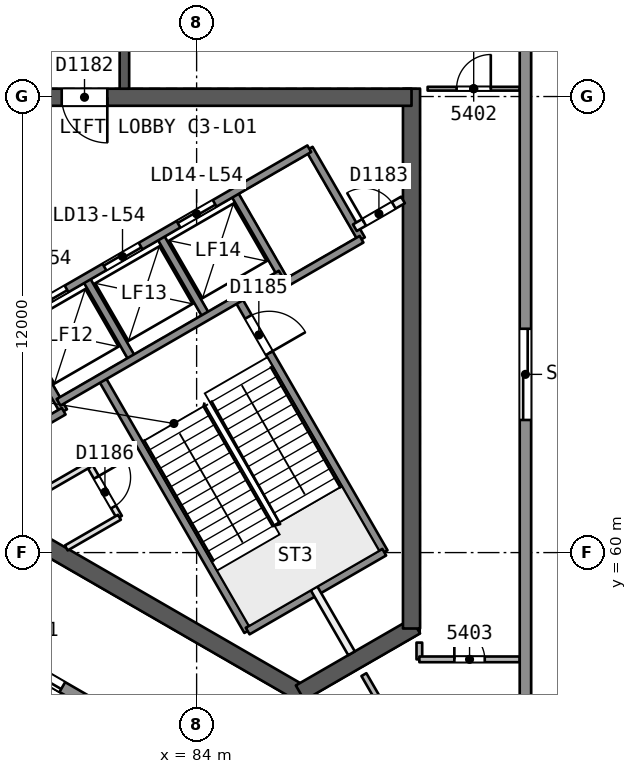
"""IFC4 building model, lengths in metres.
Left out: names, types, materials, properties, quantities, classifications, styles, units other than length and angle.
Written with IfcOpenShell. Run it as: python <this file> out.ifc"""

import sys

from ifc_helpers import new_model, si_unit, direction, frame, frame_2d, origin, place, context, subcontext, project, spatial, rectangle, extrude, element, fill, save


model = new_model("IFC4")
c1 = context("Model", 3, precision=1e-05, world=origin(), true_north=direction((0.0, 1.0)))
c2 = subcontext(c1, "Body", "Model", "MODEL_VIEW")
j1 = project(units=[si_unit("LENGTHUNIT", "METRE"), si_unit("PLANEANGLEUNIT", "RADIAN")], contexts=[c1])
p1 = place(None, origin())
s1 = spatial("IfcSite", under=j1, at=p1, CompositionType="ELEMENT")
p2 = place(p1, origin())
s2 = spatial("IfcBuilding", under=s1, at=p2, CompositionType="ELEMENT")
p3 = place(p2, frame((0.0, 0.0, 220.6)))
s3 = spatial("IfcBuildingStorey", under=s2, at=p3, CompositionType="ELEMENT", Elevation=220.6)
p4 = place(p3, frame((74.617, 63.299, 0.0), z_axis=(0.0, 0.0, 1.0), x_axis=(0.86602594008, -0.499999071108, 0.0)))
e1 = element("IfcWall", 1, at=p4, inside=s3, PredefinedType="SHEAR", context=c2, shape_type="SweptSolid", body=[
    extrude(rectangle(XDim=14.108, YDim=0.45, at=frame_2d((7.054, 0.0))), origin(), (0.0, 0.0, 1.0), 3.7),
])
p5 = place(p3, frame((86.723, 56.31, 0.0), z_axis=(0.0, 0.0, 1.0), x_axis=(0.866042179588, 0.49997094233, 0.0)))
e2 = element("IfcWall", 2, at=p5, inside=s3, PredefinedType="SHEAR", context=c2, shape_type="SweptSolid", body=[
    extrude(rectangle(XDim=3.515, YDim=0.45, at=frame_2d((1.758, 0.0))), origin(), (0.0, 0.0, 1.0), 3.7),
])
p6 = place(p3, frame((89.655, 58.002, 0.0), z_axis=(0.0, 0.0, 1.0), x_axis=(0.0, 1.0, 0.0)))
e3 = element("IfcWall", 3, at=p6, inside=s3, PredefinedType="SHEAR", context=c2, shape_type="SweptSolid", body=[
    extrude(rectangle(XDim=14.204, YDim=0.45, at=frame_2d((7.102, 0.0))), origin(), (0.0, 0.0, 1.0), 3.7),
])
p7 = place(p3, frame((89.655, 71.981, 0.0), z_axis=(0.0, 0.0, 1.0), x_axis=(-1.0, 0.0, 0.0)))
e4 = element("IfcWall", 4, at=p7, inside=s3, PredefinedType="SHEAR", context=c2, shape_type="SweptSolid", body=[
    extrude(rectangle(XDim=10.155, YDim=0.45, at=frame_2d((5.078, 0.0))), origin(), (0.0, 0.0, 1.0), 3.7),
])
p8 = place(p7, frame((8.005, 0.0, 0.0)))
e5 = element("IfcOpeningElement", 5, at=p8, cuts=e4, PredefinedType="OPENING", context=c2, shape_type="SweptSolid", body=[
    extrude(rectangle(XDim=1.2, YDim=2.1, at=frame_2d((0.6, 1.05))), frame((0.0, 0.235, 0.0), z_axis=(0.0, -1.0, 0.0), x_axis=(1.0, 0.0, 0.0)), (0.0, 0.0, 1.0), 0.471),
])
p9 = place(p3, frame((82.1, 72.206, 0.0), z_axis=(0.0, 0.0, 1.0), x_axis=(0.0, 1.0, 0.0)))
e6 = element("IfcWall", 6, at=p9, inside=s3, PredefinedType="SHEAR", context=c2, shape_type="SweptSolid", body=[
    extrude(rectangle(XDim=15.588, YDim=0.25, at=frame_2d((7.794, 0.0))), origin(), (0.0, 0.0, 1.0), 3.3),
])
p10 = place(p9, frame((2.15, 0.0, 0.0)))
e7 = element("IfcOpeningElement", 7, at=p10, cuts=e6, PredefinedType="OPENING", context=c2, shape_type="SweptSolid", body=[
    extrude(rectangle(XDim=1.0, YDim=2.1, at=frame_2d((0.5, 1.05))), frame((0.0, 0.135, 0.0), z_axis=(0.0, -1.0, 0.0), x_axis=(1.0, 0.0, 0.0)), (0.0, 0.0, 1.0), 0.271),
])
p11 = place(p9, frame((8.75, 0.0, 0.0)))
e8 = element("IfcOpeningElement", 8, at=p11, cuts=e6, PredefinedType="OPENING", context=c2, shape_type="SweptSolid", body=[
    extrude(rectangle(XDim=1.0, YDim=2.1, at=frame_2d((0.5, 1.05))), frame((0.0, 0.135, 0.0), z_axis=(0.0, -1.0, 0.0), x_axis=(1.0, 0.0, 0.0)), (0.0, 0.0, 1.0), 0.271),
])
p12 = place(p9, frame((12.594, 0.0, 0.0)))
e9 = element("IfcOpeningElement", 9, at=p12, cuts=e6, PredefinedType="OPENING", context=c2, shape_type="SweptSolid", body=[
    extrude(rectangle(XDim=1.0, YDim=2.1, at=frame_2d((0.5, 1.05))), frame((0.0, 0.135, 0.0), z_axis=(0.0, -1.0, 0.0), x_axis=(1.0, 0.0, 0.0)), (0.0, 0.0, 1.0), 0.271),
])
p13 = place(p3, frame((90.079, 72.206, 0.0), z_axis=(0.0, 0.0, 1.0), x_axis=(1.0, 0.0, 0.0)))
e10 = element("IfcWall", 10, at=p13, inside=s3, PredefinedType="PARTITIONING", context=c2, shape_type="SweptSolid", body=[
    extrude(rectangle(XDim=2.424, YDim=0.1, at=frame_2d((1.212, 0.0))), origin(), (0.0, 0.0, 1.0), 3.3),
])
p14 = place(p13, frame((0.762, 0.0, 0.0)))
e11 = element("IfcOpeningElement", 11, at=p14, cuts=e10, PredefinedType="OPENING", context=c2, shape_type="SweptSolid", body=[
    extrude(rectangle(XDim=0.9, YDim=2.1, at=frame_2d((0.45, 1.05))), frame((0.0, 0.061, 0.0), z_axis=(0.0, -1.0, 0.0), x_axis=(1.0, 0.0, 0.0)), (0.0, 0.0, 1.0), 0.121),
])
p15 = place(p3, frame((89.861, 57.632, 0.0), z_axis=(0.0, 0.0, 1.0), x_axis=(0.0, -1.0, 0.0)))
e12 = element("IfcWall", 12, at=p15, inside=s3, PredefinedType="PARTITIONING", context=c2, shape_type="SweptSolid", body=[
    extrude(rectangle(XDim=0.441, YDim=0.15, at=frame_2d((0.22, 0.0))), origin(), (0.0, 0.0, 1.0), 3.3),
])
p16 = place(p3, frame((89.861, 57.191, 0.0), z_axis=(0.0, 0.0, 1.0), x_axis=(1.0, 0.0, 0.0)))
e13 = element("IfcWall", 13, at=p16, inside=s3, PredefinedType="PARTITIONING", context=c2, shape_type="SweptSolid", body=[
    extrude(rectangle(XDim=2.642, YDim=0.15, at=frame_2d((1.321, 0.0))), origin(), (0.0, 0.0, 1.0), 3.3),
])
p17 = place(p16, frame((0.921, 0.0, 0.0)))
e14 = element("IfcOpeningElement", 14, at=p17, cuts=e13, PredefinedType="OPENING", context=c2, shape_type="SweptSolid", body=[
    extrude(rectangle(XDim=0.8, YDim=2.1, at=frame_2d((0.4, 1.05))), frame((0.0, 0.085, 0.0), z_axis=(0.0, -1.0, 0.0), x_axis=(1.0, 0.0, 0.0)), (0.0, 0.0, 1.0), 0.171),
])
p18 = place(p3, frame((88.402, 56.789, 0.0), z_axis=(0.0, 0.0, 1.0), x_axis=(0.499980071345, -0.866036909293, 0.0)))
e15 = element("IfcWall", 15, at=p18, inside=s3, PredefinedType="PARTITIONING", context=c2, shape_type="SweptSolid", body=[
    extrude(rectangle(XDim=3.856, YDim=0.15, at=frame_2d((1.928, 0.0))), origin(), (0.0, 0.0, 1.0), 3.3),
])
p19 = place(p3, frame((92.652, 105.381, 0.0), z_axis=(0.0, 0.0, 1.0), x_axis=(0.0, -1.0, 0.0)))
e16 = element("IfcWall", 16, at=p19, inside=s3, PredefinedType="SOLIDWALL", context=c2, shape_type="SweptSolid", body=[
    extrude(rectangle(XDim=50.762, YDim=0.3, at=frame_2d((25.381, 0.0))), origin(), (0.0, 0.0, 1.0), 3.3),
])
p20 = place(p19, frame((29.325, 0.0, 0.0)))
e17 = element("IfcOpeningElement", 17, at=p20, cuts=e16, PredefinedType="OPENING", context=c2, shape_type="SweptSolid", body=[
    extrude(rectangle(XDim=2.4, YDim=2.4, at=frame_2d((1.2, 1.2))), frame((0.0, 0.161, 0.0), z_axis=(0.0, -1.0, 0.0), x_axis=(1.0, 0.0, 0.0)), (0.0, 0.0, 1.0), 0.321),
])
p21 = place(p19, frame((39.492, 0.0, 0.0)))
e18 = element("IfcOpeningElement", 18, at=p21, cuts=e16, PredefinedType="OPENING", context=c2, shape_type="SweptSolid", body=[
    extrude(rectangle(XDim=2.4, YDim=2.4, at=frame_2d((1.2, 1.2))), frame((0.0, 0.161, 0.0), z_axis=(0.0, -1.0, 0.0), x_axis=(1.0, 0.0, 0.0)), (0.0, 0.0, 1.0), 0.321),
])
p22 = place(p19, frame((18.881, 0.0, 0.0)))
e19 = element("IfcOpeningElement", 19, at=p22, cuts=e16, PredefinedType="OPENING", context=c2, shape_type="SweptSolid", body=[
    extrude(rectangle(XDim=2.4, YDim=2.4, at=frame_2d((1.2, 1.2))), frame((0.0, 0.161, 0.0), z_axis=(0.0, -1.0, 0.0), x_axis=(1.0, 0.0, 0.0)), (0.0, 0.0, 1.0), 0.321),
])
p23 = place(p19, frame((8.878, 0.0, 0.0)))
e20 = element("IfcOpeningElement", 20, at=p23, cuts=e16, PredefinedType="OPENING", context=c2, shape_type="SweptSolid", body=[
    extrude(rectangle(XDim=2.4, YDim=2.4, at=frame_2d((1.2, 1.2))), frame((0.0, 0.161, 0.0), z_axis=(0.0, -1.0, 0.0), x_axis=(1.0, 0.0, 0.0)), (0.0, 0.0, 1.0), 0.321),
])
p24 = place(p19, frame((24.025, 0.0, 0.0)))
e21 = element("IfcOpeningElement", 21, at=p24, cuts=e16, PredefinedType="OPENING", context=c2, shape_type="SweptSolid", body=[
    extrude(rectangle(XDim=2.4, YDim=2.4, at=frame_2d((1.2, 1.2))), frame((0.0, 0.161, 0.0), z_axis=(0.0, -1.0, 0.0), x_axis=(1.0, 0.0, 0.0)), (0.0, 0.0, 1.0), 0.321),
])
p25 = place(p3, frame((88.155, 52.022, 0.0), z_axis=(0.0, 0.0, 1.0), x_axis=(-0.866024521231, 0.500001528624, 0.0)))
e22 = element("IfcWall", 22, at=p25, inside=s3, PredefinedType="SOLIDWALL", context=c2, shape_type="SweptSolid", body=[
    extrude(rectangle(XDim=50.762, YDim=0.3, at=frame_2d((25.381, 0.0))), origin(), (0.0, 0.0, 1.0), 3.3),
])
p26 = place(p25, frame((23.402, 0.0, 0.0)))
e23 = element("IfcOpeningElement", 23, at=p26, cuts=e22, PredefinedType="OPENING", context=c2, shape_type="SweptSolid", body=[
    extrude(rectangle(XDim=2.4, YDim=2.4, at=frame_2d((1.2, 1.2))), frame((0.0, 0.161, 0.0), z_axis=(0.0, -1.0, 0.0), x_axis=(1.0, 0.0, 0.0)), (0.0, 0.0, 1.0), 0.321),
])
p27 = place(p25, frame((29.013, 0.0, 0.0)))
e24 = element("IfcOpeningElement", 24, at=p27, cuts=e22, PredefinedType="OPENING", context=c2, shape_type="SweptSolid", body=[
    extrude(rectangle(XDim=2.4, YDim=2.4, at=frame_2d((1.2, 1.2))), frame((0.0, 0.161, 0.0), z_axis=(0.0, -1.0, 0.0), x_axis=(1.0, 0.0, 0.0)), (0.0, 0.0, 1.0), 0.321),
])
p28 = place(p25, frame((39.492, 0.0, 0.0)))
e25 = element("IfcOpeningElement", 25, at=p28, cuts=e22, PredefinedType="OPENING", context=c2, shape_type="SweptSolid", body=[
    extrude(rectangle(XDim=2.4, YDim=2.4, at=frame_2d((1.2, 1.2))), frame((0.0, 0.161, 0.0), z_axis=(0.0, -1.0, 0.0), x_axis=(1.0, 0.0, 0.0)), (0.0, 0.0, 1.0), 0.321),
])
p29 = place(p25, frame((18.569, 0.0, 0.0)))
e26 = element("IfcOpeningElement", 26, at=p29, cuts=e22, PredefinedType="OPENING", context=c2, shape_type="SweptSolid", body=[
    extrude(rectangle(XDim=2.4, YDim=2.4, at=frame_2d((1.2, 1.2))), frame((0.0, 0.161, 0.0), z_axis=(0.0, -1.0, 0.0), x_axis=(1.0, 0.0, 0.0)), (0.0, 0.0, 1.0), 0.321),
])
p30 = place(p25, frame((8.878, 0.0, 0.0)))
e27 = element("IfcOpeningElement", 27, at=p30, cuts=e22, PredefinedType="OPENING", context=c2, shape_type="SweptSolid", body=[
    extrude(rectangle(XDim=2.4, YDim=2.4, at=frame_2d((1.2, 1.2))), frame((0.0, 0.161, 0.0), z_axis=(0.0, -1.0, 0.0), x_axis=(1.0, 0.0, 0.0)), (0.0, 0.0, 1.0), 0.321),
])
p31 = place(p3, frame((81.169, 62.315, 0.0), z_axis=(0.0, 0.0, 1.0), x_axis=(0.499995408039, -0.866028054938, 0.0)))
e28 = element("IfcWall", 28, at=p31, inside=s3, PredefinedType="PARTITIONING", context=c2, shape_type="SweptSolid", body=[
    extrude(rectangle(XDim=1.6, YDim=0.15, at=frame_2d((0.8, 0.0))), origin(), (0.0, 0.0, 1.0), 3.3),
])
p32 = place(p31, frame((0.387, 0.0, 0.0)))
e29 = element("IfcOpeningElement", 29, at=p32, cuts=e28, PredefinedType="OPENING", context=c2, shape_type="SweptSolid", body=[
    extrude(rectangle(XDim=0.9, YDim=2.1, at=frame_2d((0.45, 1.05))), frame((0.0, 0.085, 0.0), z_axis=(0.0, -1.0, 0.0), x_axis=(1.0, 0.0, 0.0)), (0.0, 0.0, 1.0), 0.171),
])
p33 = place(p3, frame((79.127, 66.102, 0.0), z_axis=(0.0, 0.0, 1.0), x_axis=(0.499996545922, -0.866027397988, 0.0)))
e30 = element("IfcWall", 30, at=p33, inside=s3, PredefinedType="SOLIDWALL", context=c2, shape_type="SweptSolid", body=[
    extrude(rectangle(XDim=2.75, YDim=0.2, at=frame_2d((1.375, 0.0))), origin(), (0.0, 0.0, 1.0), 3.3),
])
p34 = place(p3, frame((81.493, 64.604, 0.0), z_axis=(0.0, 0.0, 1.0), x_axis=(0.500006057782, -0.866021906294, 0.0)))
e31 = element("IfcWall", 31, at=p34, inside=s3, PredefinedType="SOLIDWALL", context=c2, shape_type="SweptSolid", body=[
    extrude(rectangle(XDim=7.7, YDim=0.2, at=frame_2d((3.85, 0.0))), origin(), (0.0, 0.0, 1.0), 3.3),
])
p35 = place(p3, frame((81.076, 67.227, 0.0), z_axis=(0.0, 0.0, 1.0), x_axis=(0.50000366821, -0.866023285932, 0.0)))
e32 = element("IfcWall", 32, at=p35, inside=s3, PredefinedType="SOLIDWALL", context=c2, shape_type="SweptSolid", body=[
    extrude(rectangle(XDim=2.48, YDim=0.2, at=frame_2d((1.24, 0.0))), origin(), (0.0, 0.0, 1.0), 3.3),
])
p36 = place(p3, frame((87.09, 59.06, 0.0), z_axis=(0.0, 0.0, 1.0), x_axis=(0.500011643316, -0.866018681408, 0.0)))
e33 = element("IfcWall", 33, at=p36, inside=s3, PredefinedType="PARTITIONING", context=c2, shape_type="SweptSolid", body=[
    extrude(rectangle(XDim=1.973, YDim=0.2, at=frame_2d((0.987, 0.0))), origin(), (0.0, 0.0, 1.0), 3.3),
])
p37 = place(p3, frame((83.024, 68.352, 0.0), z_axis=(0.0, 0.0, 1.0), x_axis=(0.50000366821, -0.866023285932, 0.0)))
e34 = element("IfcWall", 34, at=p37, inside=s3, PredefinedType="SOLIDWALL", context=c2, shape_type="SweptSolid", body=[
    extrude(rectangle(XDim=2.48, YDim=0.2, at=frame_2d((1.24, 0.0))), origin(), (0.0, 0.0, 1.0), 3.3),
])
p38 = place(p3, frame((85.087, 66.679, 0.0), z_axis=(0.0, 0.0, 1.0), x_axis=(0.500019787375, -0.866013979237, 0.0)))
e35 = element("IfcWall", 35, at=p38, inside=s3, PredefinedType="SOLIDWALL", context=c2, shape_type="SweptSolid", body=[
    extrude(rectangle(XDim=7.7, YDim=0.2, at=frame_2d((3.85, 0.0))), origin(), (0.0, 0.0, 1.0), 3.3),
])
p39 = place(p38, frame((0.55, 0.0, 0.0)))
e36 = element("IfcOpeningElement", 36, at=p39, cuts=e35, PredefinedType="OPENING", context=c2, shape_type="SweptSolid", body=[
    extrude(rectangle(XDim=1.1, YDim=2.1, at=frame_2d((0.55, 1.05))), frame((0.0, 0.11, 0.0), z_axis=(0.0, -1.0, 0.0), x_axis=(1.0, 0.0, 0.0)), (0.0, 0.0, 1.0), 0.221),
])
for number, where, z_axis, x_axis in (
    (37, (84.973, 69.477, 0.0), (0.0, 0.0, 1.0), (0.5, -0.866, 0.0)),
    (38, (86.965, 70.626, 0.0), (0.0, 0.0, 1.0), (0.5, -0.866, 0.0)),
):
    element("IfcWall", number, at=place(p3, frame(where, z_axis=z_axis, x_axis=x_axis)), inside=s3, PredefinedType="SOLIDWALL", context=c2, shape_type="SweptSolid", body=[
        extrude(rectangle(XDim=2.75, YDim=0.2, at=frame_2d((1.375, 0.0))), origin(), (0.0, 0.0, 1.0), 3.3),
    ])
p40 = place(p3, frame((77.135, 64.952, 0.0), z_axis=(0.0, 0.0, 1.0), x_axis=(0.866031916153, 0.499988720078, 0.0)))
e39 = element("IfcWall", 39, at=p40, inside=s3, PredefinedType="SOLIDWALL", context=c2, shape_type="SweptSolid", body=[
    extrude(rectangle(XDim=11.35, YDim=0.2, at=frame_2d((5.675, 0.0))), origin(), (0.0, 0.0, 1.0), 3.3),
])
p41 = place(p40, frame((2.875, 0.0, 0.0)))
e40 = element("IfcOpeningElement", 40, at=p41, cuts=e39, PredefinedType="OPENING", context=c2, shape_type="SweptSolid", body=[
    extrude(rectangle(XDim=1.1, YDim=2.1, at=frame_2d((0.55, 1.05))), frame((0.0, 0.11, 0.0), z_axis=(0.0, -1.0, 0.0), x_axis=(1.0, 0.0, 0.0)), (0.0, 0.0, 1.0), 0.221),
])
p42 = place(p40, frame((5.125, 0.0, 0.0)))
e41 = element("IfcOpeningElement", 41, at=p42, cuts=e39, PredefinedType="OPENING", context=c2, shape_type="SweptSolid", body=[
    extrude(rectangle(XDim=1.1, YDim=2.1, at=frame_2d((0.55, 1.05))), frame((0.0, 0.11, 0.0), z_axis=(0.0, -1.0, 0.0), x_axis=(1.0, 0.0, 0.0)), (0.0, 0.0, 1.0), 0.221),
])
p43 = place(p40, frame((7.375, 0.0, 0.0)))
e42 = element("IfcOpeningElement", 42, at=p43, cuts=e39, PredefinedType="OPENING", context=c2, shape_type="SweptSolid", body=[
    extrude(rectangle(XDim=1.1, YDim=2.1, at=frame_2d((0.55, 1.05))), frame((0.0, 0.11, 0.0), z_axis=(0.0, -1.0, 0.0), x_axis=(1.0, 0.0, 0.0)), (0.0, 0.0, 1.0), 0.221),
])
p44 = place(p3, frame((88.165, 68.548, 0.0), z_axis=(0.0, 0.0, 1.0), x_axis=(0.866013036001, 0.500021421018, 0.0)))
e43 = element("IfcWall", 43, at=p44, inside=s3, PredefinedType="PARTITIONING", context=c2, shape_type="SweptSolid", body=[
    extrude(rectangle(XDim=1.461, YDim=0.2, at=frame_2d((0.73, 0.0))), origin(), (0.0, 0.0, 1.0), 3.3),
])
p45 = place(p44, frame((0.281, 0.0, 0.0)))
e44 = element("IfcOpeningElement", 44, at=p45, cuts=e43, PredefinedType="OPENING", context=c2, shape_type="SweptSolid", body=[
    extrude(rectangle(XDim=0.9, YDim=2.1, at=frame_2d((0.45, 1.05))), frame((0.0, 0.11, 0.0), z_axis=(0.0, -1.0, 0.0), x_axis=(1.0, 0.0, 0.0)), (0.0, 0.0, 1.0), 0.221),
])
p46 = place(p3, frame((80.367, 63.954, 0.0), z_axis=(0.0, 0.0, 1.0), x_axis=(0.866026575979, 0.499997969693, 0.0)))
e45 = element("IfcWall", 45, at=p46, inside=s3, PredefinedType="SOLIDWALL", context=c2, shape_type="SweptSolid", body=[
    extrude(rectangle(XDim=6.75, YDim=0.2, at=frame_2d((3.375, 0.0))), origin(), (0.0, 0.0, 1.0), 3.3),
])
p47 = place(p3, frame((78.51, 62.57, 0.0), z_axis=(0.0, 0.0, 1.0), x_axis=(0.866053019151, 0.499952165731, 0.0)))
e46 = element("IfcWall", 46, at=p47, inside=s3, PredefinedType="SOLIDWALL", context=c2, shape_type="SweptSolid", body=[
    extrude(rectangle(XDim=2.3, YDim=0.2, at=frame_2d((1.15, 0.0))), origin(), (0.0, 0.0, 1.0), 3.3),
])
p48 = place(p3, frame((86.348, 67.095, 0.0), z_axis=(0.0, 0.0, 1.0), x_axis=(0.86602648383, 0.499998129301, 0.0)))
e47 = element("IfcWall", 47, at=p48, inside=s3, PredefinedType="SOLIDWALL", context=c2, shape_type="SweptSolid", body=[
    extrude(rectangle(XDim=2.3, YDim=0.2, at=frame_2d((1.15, 0.0))), origin(), (0.0, 0.0, 1.0), 3.3),
])
p49 = place(p3, frame((78.97, 61.046, 0.0), z_axis=(0.0, 0.0, 1.0), x_axis=(0.866033475577, 0.499986018985, 0.0)))
e48 = element("IfcWall", 48, at=p49, inside=s3, PredefinedType="PARTITIONING", context=c2, shape_type="SweptSolid", body=[
    extrude(rectangle(XDim=2.539, YDim=0.15, at=frame_2d((1.27, 0.0))), origin(), (0.0, 0.0, 1.0), 3.3),
])
p50 = place(p3, frame((80.57, 60.122, 0.0), z_axis=(0.0, 0.0, 1.0), x_axis=(0.866039608017, 0.49997539674, 0.0)))
e49 = element("IfcWall", 49, at=p50, inside=s3, PredefinedType="PARTITIONING", context=c2, shape_type="SweptSolid", body=[
    extrude(rectangle(XDim=1.615, YDim=0.15, at=frame_2d((0.808, 0.0))), origin(), (0.0, 0.0, 1.0), 3.3),
])
p51 = place(p3, frame((85.343, 57.935, 0.0), z_axis=(0.0, 0.0, 1.0), x_axis=(0.866004344652, 0.500036473714, 0.0)))
e50 = element("IfcWall", 50, at=p51, inside=s3, PredefinedType="SOLIDWALL", context=c2, shape_type="SweptSolid", body=[
    extrude(rectangle(XDim=4.15, YDim=0.2, at=frame_2d((2.075, 0.0))), origin(), (0.0, 0.0, 1.0), 3.3),
])
p52 = place(p14, origin())
e51 = element("IfcDoor", 51, at=p52, inside=s3, OperationType="SINGLE_SWING_RIGHT", PredefinedType="NOTDEFINED", context=c2, shape_type="SweptSolid", body=[
    extrude(rectangle(XDim=0.9, YDim=2.1, at=frame_2d((0.45, 1.05))), frame((0.0, 0.025, 0.0), z_axis=(0.0, -1.0, 0.0), x_axis=(1.0, 0.0, 0.0)), (0.0, 0.0, 1.0), 0.05),
])
fill(e11, e51)
p53 = place(p17, origin())
e52 = element("IfcDoor", 52, at=p53, inside=s3, OperationType="SINGLE_SWING_LEFT", PredefinedType="NOTDEFINED", context=c2, shape_type="SweptSolid", body=[
    extrude(rectangle(XDim=0.8, YDim=2.1, at=frame_2d((0.4, 1.05))), frame((0.0, 0.025, 0.0), z_axis=(0.0, -1.0, 0.0), x_axis=(1.0, 0.0, 0.0)), (0.0, 0.0, 1.0), 0.05),
])
fill(e14, e52)
p54 = place(p21, origin())
e53 = element("IfcDoor", 53, at=p54, inside=s3, OperationType="SLIDING_TO_RIGHT", PredefinedType="NOTDEFINED", context=c2, shape_type="SweptSolid", body=[
    extrude(rectangle(XDim=2.4, YDim=2.4, at=frame_2d((1.2, 1.2))), frame((0.0, 0.025, 0.0), z_axis=(0.0, -1.0, 0.0), x_axis=(1.0, 0.0, 0.0)), (0.0, 0.0, 1.0), 0.05),
])
fill(e18, e53)
p55 = place(p30, origin())
e54 = element("IfcDoor", 54, at=p55, inside=s3, OperationType="SLIDING_TO_LEFT", PredefinedType="NOTDEFINED", context=c2, shape_type="SweptSolid", body=[
    extrude(rectangle(XDim=2.4, YDim=2.4, at=frame_2d((1.2, 1.2))), frame((0.0, 0.025, 0.0), z_axis=(0.0, -1.0, 0.0), x_axis=(1.0, 0.0, 0.0)), (0.0, 0.0, 1.0), 0.05),
])
fill(e27, e54)
p56 = place(p8, origin())
e55 = element("IfcDoor", 55, at=p56, inside=s3, OperationType="SINGLE_SWING_LEFT", PredefinedType="NOTDEFINED", context=c2, shape_type="SweptSolid", body=[
    extrude(rectangle(XDim=1.2, YDim=2.1, at=frame_2d((0.6, 1.05))), frame((0.0, 0.025, 0.0), z_axis=(0.0, -1.0, 0.0), x_axis=(1.0, 0.0, 0.0)), (0.0, 0.0, 1.0), 0.05),
])
fill(e5, e55)
p57 = place(p41, origin())
e56 = element("IfcDoor", 56, at=p57, inside=s3, OperationType="SLIDING_TO_LEFT", PredefinedType="NOTDEFINED", context=c2, shape_type="SweptSolid", body=[
    extrude(rectangle(XDim=1.1, YDim=2.1, at=frame_2d((0.55, 1.05))), frame((0.0, 0.025, 0.0), z_axis=(0.0, -1.0, 0.0), x_axis=(1.0, 0.0, 0.0)), (0.0, 0.0, 1.0), 0.05),
])
fill(e40, e56)
p58 = place(p42, origin())
e57 = element("IfcDoor", 57, at=p58, inside=s3, OperationType="SLIDING_TO_RIGHT", PredefinedType="NOTDEFINED", context=c2, shape_type="SweptSolid", body=[
    extrude(rectangle(XDim=1.1, YDim=2.1, at=frame_2d((0.55, 1.05))), frame((0.0, 0.025, 0.0), z_axis=(0.0, -1.0, 0.0), x_axis=(1.0, 0.0, 0.0)), (0.0, 0.0, 1.0), 0.05),
])
fill(e41, e57)
p59 = place(p43, origin())
e58 = element("IfcDoor", 58, at=p59, inside=s3, OperationType="SLIDING_TO_LEFT", PredefinedType="NOTDEFINED", context=c2, shape_type="SweptSolid", body=[
    extrude(rectangle(XDim=1.1, YDim=2.1, at=frame_2d((0.55, 1.05))), frame((0.0, 0.025, 0.0), z_axis=(0.0, -1.0, 0.0), x_axis=(1.0, 0.0, 0.0)), (0.0, 0.0, 1.0), 0.05),
])
fill(e42, e58)
p60 = place(p45, origin())
e59 = element("IfcDoor", 59, at=p60, inside=s3, OperationType="SINGLE_SWING_LEFT", PredefinedType="NOTDEFINED", context=c2, shape_type="SweptSolid", body=[
    extrude(rectangle(XDim=0.9, YDim=2.1, at=frame_2d((0.45, 1.05))), frame((0.0, 0.025, 0.0), z_axis=(0.0, -1.0, 0.0), x_axis=(1.0, 0.0, 0.0)), (0.0, 0.0, 1.0), 0.05),
])
fill(e44, e59)
p61 = place(p39, origin())
e60 = element("IfcDoor", 60, at=p61, inside=s3, OperationType="SINGLE_SWING_RIGHT", PredefinedType="NOTDEFINED", context=c2, shape_type="SweptSolid", body=[
    extrude(rectangle(XDim=1.1, YDim=2.1, at=frame_2d((0.55, 1.05))), frame((0.0, 0.025, 0.0), z_axis=(0.0, -1.0, 0.0), x_axis=(1.0, 0.0, 0.0)), (0.0, 0.0, 1.0), 0.05),
])
fill(e36, e60)
p62 = place(p32, origin())
e61 = element("IfcDoor", 61, at=p62, inside=s3, OperationType="SINGLE_SWING_LEFT", PredefinedType="NOTDEFINED", context=c2, shape_type="SweptSolid", body=[
    extrude(rectangle(XDim=0.9, YDim=2.1, at=frame_2d((0.45, 1.05))), frame((0.0, 0.025, 0.0), z_axis=(0.0, -1.0, 0.0), x_axis=(1.0, 0.0, 0.0)), (0.0, 0.0, 1.0), 0.05),
])
fill(e29, e61)
save(model, sys.argv[1])
